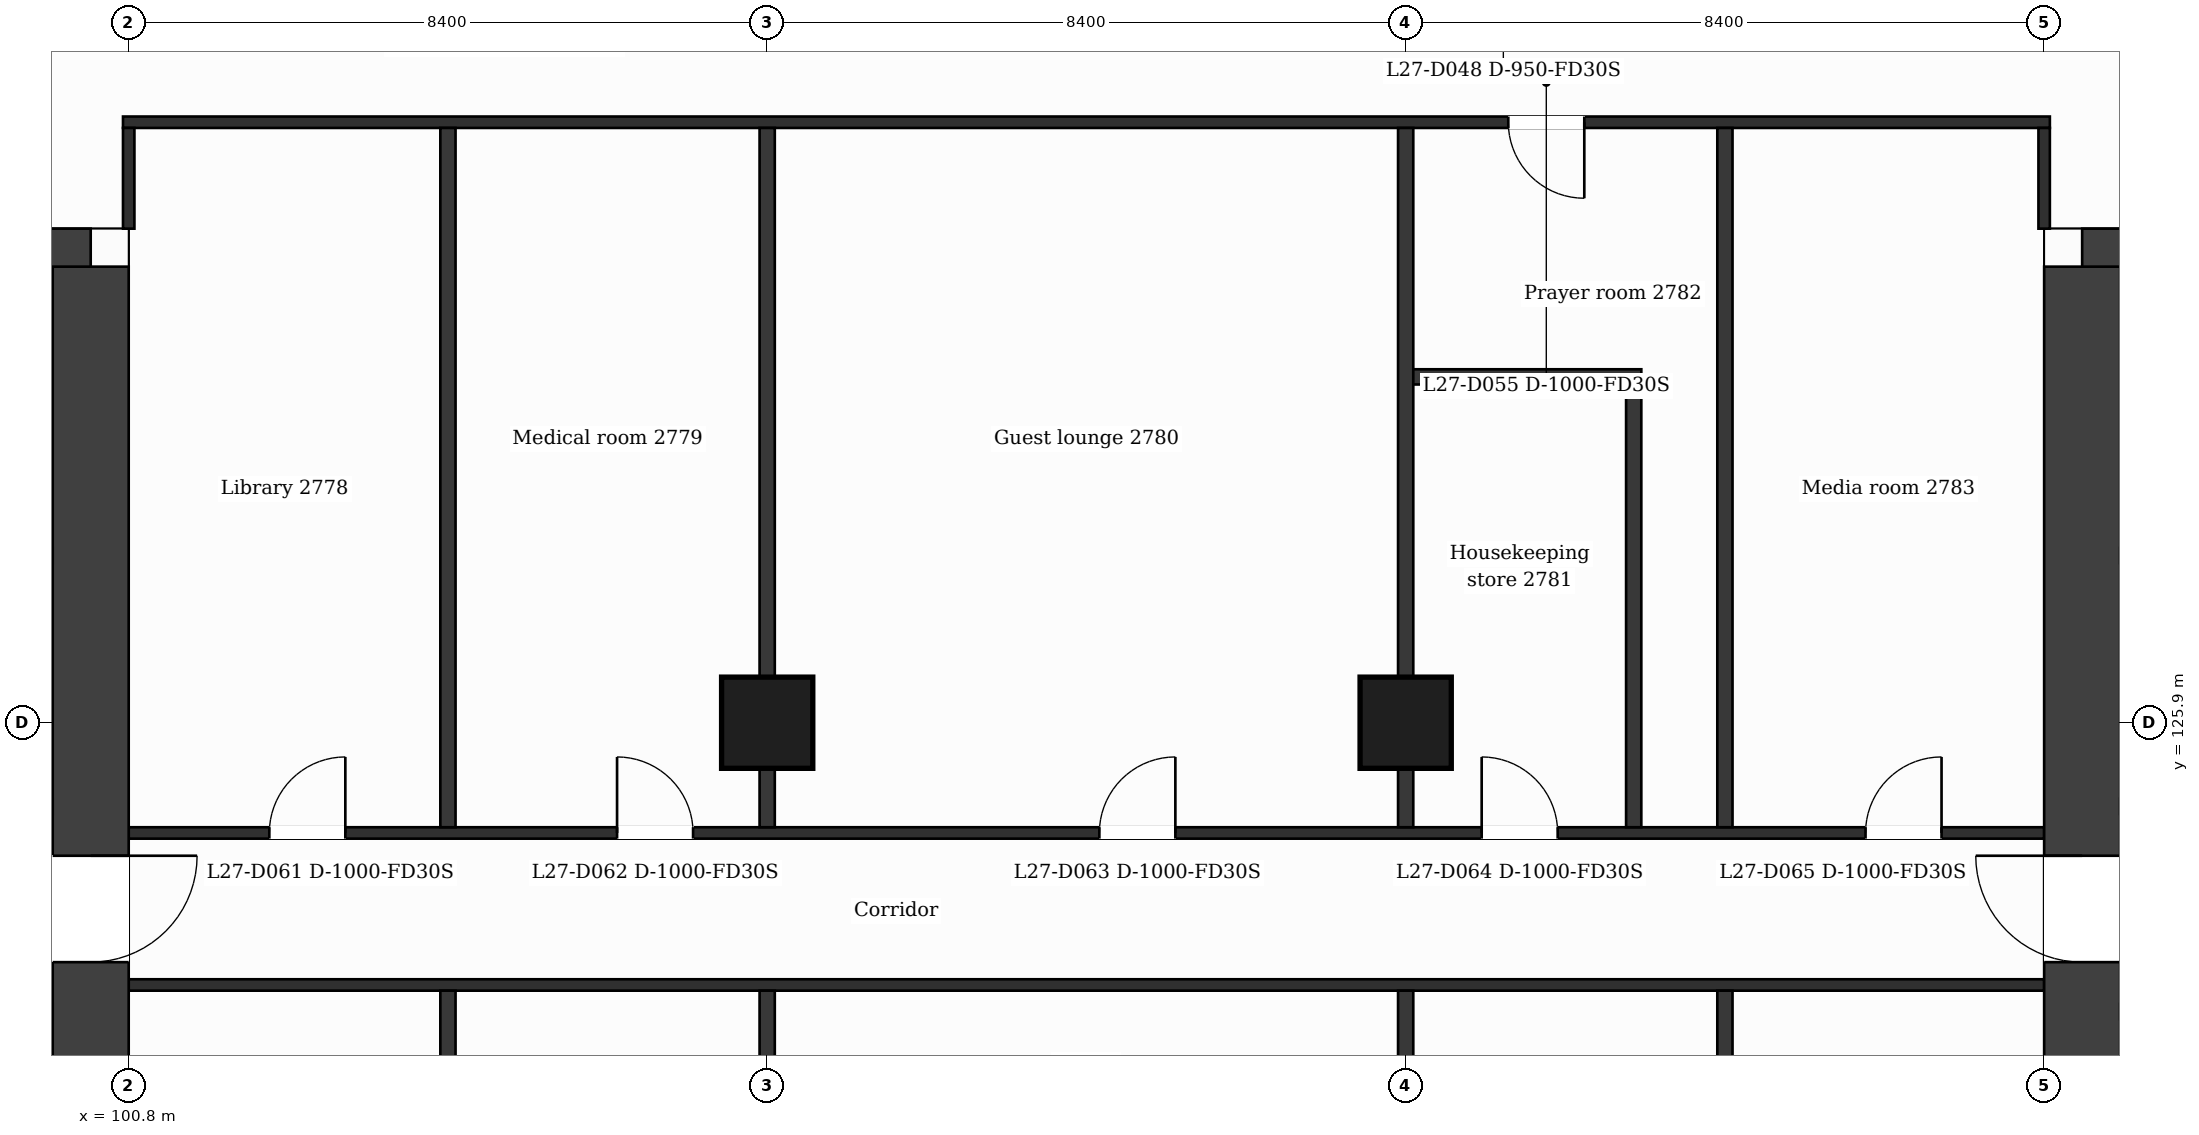
"""IFC4 building model, lengths in metres.
Left out: names, types, materials, properties, quantities, classifications, styles, units other than length and angle.
Written with IfcOpenShell. Run it as: python <this file> out.ifc"""

import sys

from ifc_helpers import new_model, si_unit, direction, frame, frame_2d, origin, origin_2d, place, context, subcontext, project, spatial, rectangle, extrude, element, fill, save


model = new_model("IFC4")
c1 = context("Model", 3, precision=1e-05, world=origin(), true_north=direction((0.0, 1.0)))
c2 = subcontext(c1, "Body", "Model", "MODEL_VIEW")
j1 = project(units=[si_unit("LENGTHUNIT", "METRE"), si_unit("PLANEANGLEUNIT", "RADIAN")], contexts=[c1])
p1 = place(None, origin())
s1 = spatial("IfcSite", under=j1, at=p1, CompositionType="ELEMENT")
p2 = place(p1, origin())
s2 = spatial("IfcBuilding", under=s1, at=p2, CompositionType="ELEMENT")
p3 = place(p2, frame((0.0, 0.0, 116.9)))
s3 = spatial("IfcBuildingStorey", under=s2, at=p3, CompositionType="ELEMENT", Elevation=116.9)
p4 = place(p3, frame((89.068, 131.9, 0.0), z_axis=(0.0, 0.0, 1.0), x_axis=(1.0, 0.0, 0.0)))
e1 = element("IfcWall", 1, at=p4, inside=s3, PredefinedType="SHEAR", context=c2, shape_type="SweptSolid", body=[
    extrude(rectangle(XDim=11.232, YDim=1.0, at=frame_2d((5.616, 0.0))), origin(), (0.0, 0.0, 1.0), 3.7),
])
p5 = place(p4, frame((6.646, 0.0, 0.0)))
e2 = element("IfcOpeningElement", 2, at=p5, cuts=e1, PredefinedType="OPENING", context=c2, shape_type="SweptSolid", body=[
    extrude(rectangle(XDim=1.2, YDim=2.1, at=frame_2d((0.6, 1.05))), frame((0.0, 0.51, 0.0), z_axis=(0.0, -1.0, 0.0), x_axis=(1.0, 0.0, 0.0)), (0.0, 0.0, 1.0), 1.02),
])
p6 = place(p3, frame((100.3, 131.9, 0.0), z_axis=(0.0, 0.0, 1.0), x_axis=(0.0, -1.0, 0.0)))
e3 = element("IfcWall", 3, at=p6, inside=s3, PredefinedType="SHEAR", context=c2, shape_type="SweptSolid", body=[
    extrude(rectangle(XDim=21.0, YDim=1.0, at=frame_2d((10.5, 0.0))), origin(), (0.0, 0.0, 1.0), 3.7),
])
p7 = place(p6, frame((7.75, 0.0, 0.0)))
e4 = element("IfcOpeningElement", 4, at=p7, cuts=e3, PredefinedType="OPENING", context=c2, shape_type="SweptSolid", body=[
    extrude(rectangle(XDim=1.4, YDim=2.1, at=frame_2d((0.7, 1.05))), frame((0.0, 0.51, 0.0), z_axis=(0.0, -1.0, 0.0), x_axis=(1.0, 0.0, 0.0)), (0.0, 0.0, 1.0), 1.02),
])
p8 = place(p3, frame((126.5, 131.9, 0.0), z_axis=(0.0, 0.0, 1.0), x_axis=(1.0, 0.0, 0.0)))
e5 = element("IfcWall", 5, at=p8, inside=s3, PredefinedType="SHEAR", context=c2, shape_type="SweptSolid", body=[
    extrude(rectangle(XDim=11.232, YDim=1.0, at=frame_2d((5.616, 0.0))), origin(), (0.0, 0.0, 1.0), 3.7),
])
p9 = place(p8, frame((3.386, 0.0, 0.0)))
e6 = element("IfcOpeningElement", 6, at=p9, cuts=e5, PredefinedType="OPENING", context=c2, shape_type="SweptSolid", body=[
    extrude(rectangle(XDim=1.2, YDim=2.1, at=frame_2d((0.6, 1.05))), frame((0.0, 0.51, 0.0), z_axis=(0.0, -1.0, 0.0), x_axis=(1.0, 0.0, 0.0)), (0.0, 0.0, 1.0), 1.02),
])
p10 = place(p3, frame((126.5, 110.9, 0.0), z_axis=(0.0, 0.0, 1.0), x_axis=(0.0, 1.0, 0.0)))
e7 = element("IfcWall", 7, at=p10, inside=s3, PredefinedType="SHEAR", context=c2, shape_type="SweptSolid", body=[
    extrude(rectangle(XDim=21.0, YDim=1.0, at=frame_2d((10.5, 0.0))), origin(), (0.0, 0.0, 1.0), 3.7),
])
p11 = place(p10, frame((11.85, 0.0, 0.0)))
e8 = element("IfcOpeningElement", 8, at=p11, cuts=e7, PredefinedType="OPENING", context=c2, shape_type="SweptSolid", body=[
    extrude(rectangle(XDim=1.4, YDim=2.1, at=frame_2d((0.7, 1.05))), frame((0.0, 0.51, 0.0), z_axis=(0.0, -1.0, 0.0), x_axis=(1.0, 0.0, 0.0)), (0.0, 0.0, 1.0), 1.02),
])
for number, where, z_axis, x_axis in (
    (9, (109.2, 125.9, 0.0), (0.0, 0.0, 1.0), (1.0, 0.0, 0.0)),
    (10, (117.6, 125.9, 0.0), (0.0, 0.0, 1.0), (1.0, 0.0, 0.0)),
):
    element("IfcColumn", number, at=place(p3, frame(where, z_axis=z_axis, x_axis=x_axis)), inside=s3, PredefinedType="COLUMN", context=c2, shape_type="SweptSolid", body=[
        extrude(rectangle(XDim=1.2, YDim=1.2, at=origin_2d()), origin(), (0.0, 0.0, 1.0), 3.7),
    ])
p12 = place(p3, frame((95.227, 122.1, 0.0), z_axis=(0.0, 0.0, 1.0), x_axis=(1.0, 0.0, 0.0)))
e11 = element("IfcWall", 11, at=p12, inside=s3, PredefinedType="PARTITIONING", context=c2, shape_type="SweptSolid", body=[
    extrude(rectangle(XDim=4.573, YDim=0.2, at=frame_2d((2.287, 0.0))), origin(), (0.0, 0.0, 1.0), 3.38),
])
p13 = place(p12, frame((2.134, 0.0, 0.0)))
e12 = element("IfcOpeningElement", 12, at=p13, cuts=e11, PredefinedType="OPENING", context=c2, shape_type="SweptSolid", body=[
    extrude(rectangle(XDim=0.9, YDim=2.1, at=frame_2d((0.45, 1.05))), frame((0.0, 0.11, 0.0), z_axis=(0.0, -1.0, 0.0), x_axis=(1.0, 0.0, 0.0)), (0.0, 0.0, 1.0), 0.22),
])
p14 = place(p3, frame((100.8, 122.45, 0.0), z_axis=(0.0, 0.0, 1.0), x_axis=(1.0, 0.0, 0.0)))
e13 = element("IfcWall", 13, at=p14, inside=s3, PredefinedType="PARTITIONING", context=c2, shape_type="SweptSolid", body=[
    extrude(rectangle(XDim=25.2, YDim=0.15, at=frame_2d((12.6, 0.0))), origin(), (0.0, 0.0, 1.0), 3.38),
])
p15 = place(p3, frame((100.8, 124.45, 0.0), z_axis=(0.0, 0.0, 1.0), x_axis=(1.0, 0.0, 0.0)))
e14 = element("IfcWall", 14, at=p15, inside=s3, PredefinedType="PARTITIONING", context=c2, shape_type="SweptSolid", body=[
    extrude(rectangle(XDim=25.2, YDim=0.15, at=frame_2d((12.6, 0.0))), origin(), (0.0, 0.0, 1.0), 3.38),
])
p16 = place(p15, frame((1.85, 0.0, 0.0)))
e15 = element("IfcOpeningElement", 15, at=p16, cuts=e14, PredefinedType="OPENING", context=c2, shape_type="SweptSolid", body=[
    extrude(rectangle(XDim=1.0, YDim=2.1, at=frame_2d((0.5, 1.05))), frame((0.0, 0.085, 0.0), z_axis=(0.0, -1.0, 0.0), x_axis=(1.0, 0.0, 0.0)), (0.0, 0.0, 1.0), 0.17),
])
p17 = place(p15, frame((6.425, 0.0, 0.0)))
e16 = element("IfcOpeningElement", 16, at=p17, cuts=e14, PredefinedType="OPENING", context=c2, shape_type="SweptSolid", body=[
    extrude(rectangle(XDim=1.0, YDim=2.1, at=frame_2d((0.5, 1.05))), frame((0.0, 0.085, 0.0), z_axis=(0.0, -1.0, 0.0), x_axis=(1.0, 0.0, 0.0)), (0.0, 0.0, 1.0), 0.17),
])
p18 = place(p15, frame((12.77, 0.0, 0.0)))
e17 = element("IfcOpeningElement", 17, at=p18, cuts=e14, PredefinedType="OPENING", context=c2, shape_type="SweptSolid", body=[
    extrude(rectangle(XDim=1.0, YDim=2.1, at=frame_2d((0.5, 1.05))), frame((0.0, 0.085, 0.0), z_axis=(0.0, -1.0, 0.0), x_axis=(1.0, 0.0, 0.0)), (0.0, 0.0, 1.0), 0.17),
])
p19 = place(p15, frame((17.8, 0.0, 0.0)))
e18 = element("IfcOpeningElement", 18, at=p19, cuts=e14, PredefinedType="OPENING", context=c2, shape_type="SweptSolid", body=[
    extrude(rectangle(XDim=1.0, YDim=2.1, at=frame_2d((0.5, 1.05))), frame((0.0, 0.085, 0.0), z_axis=(0.0, -1.0, 0.0), x_axis=(1.0, 0.0, 0.0)), (0.0, 0.0, 1.0), 0.17),
])
p20 = place(p15, frame((22.85, 0.0, 0.0)))
e19 = element("IfcOpeningElement", 19, at=p20, cuts=e14, PredefinedType="OPENING", context=c2, shape_type="SweptSolid", body=[
    extrude(rectangle(XDim=1.0, YDim=2.1, at=frame_2d((0.5, 1.05))), frame((0.0, 0.085, 0.0), z_axis=(0.0, -1.0, 0.0), x_axis=(1.0, 0.0, 0.0)), (0.0, 0.0, 1.0), 0.17),
])
p21 = place(p3, frame((127.0, 124.8, 0.0), z_axis=(0.0, 0.0, 1.0), x_axis=(1.0, 0.0, 0.0)))
e20 = element("IfcWall", 20, at=p21, inside=s3, PredefinedType="PARTITIONING", context=c2, shape_type="SweptSolid", body=[
    extrude(rectangle(XDim=4.649, YDim=0.2, at=frame_2d((2.324, 0.0))), origin(), (0.0, 0.0, 1.0), 3.38),
])
p22 = place(p21, frame((0.743, 0.0, 0.0)))
e21 = element("IfcOpeningElement", 21, at=p22, cuts=e20, PredefinedType="OPENING", context=c2, shape_type="SweptSolid", body=[
    extrude(rectangle(XDim=1.1, YDim=2.1, at=frame_2d((0.55, 1.05))), frame((0.0, 0.11, 0.0), z_axis=(0.0, -1.0, 0.0), x_axis=(1.0, 0.0, 0.0)), (0.0, 0.0, 1.0), 0.22),
])
p23 = place(p3, frame((127.0, 128.1, 0.0), z_axis=(0.0, 0.0, 1.0), x_axis=(1.0, 0.0, 0.0)))
e22 = element("IfcWall", 22, at=p23, inside=s3, PredefinedType="PARTITIONING", context=c2, shape_type="SweptSolid", body=[
    extrude(rectangle(XDim=4.649, YDim=0.2, at=frame_2d((2.324, 0.0))), origin(), (0.0, 0.0, 1.0), 3.38),
])
p24 = place(p23, frame((2.805, 0.0, 0.0)))
e23 = element("IfcOpeningElement", 23, at=p24, cuts=e22, PredefinedType="OPENING", context=c2, shape_type="SweptSolid", body=[
    extrude(rectangle(XDim=1.1, YDim=2.1, at=frame_2d((0.55, 1.05))), frame((0.0, 0.11, 0.0), z_axis=(0.0, -1.0, 0.0), x_axis=(1.0, 0.0, 0.0)), (0.0, 0.0, 1.0), 0.22),
])
p25 = place(p3, frame((117.6, 130.45, 0.0), z_axis=(0.0, 0.0, 1.0), x_axis=(1.0, 0.0, 0.0)))
e24 = element("IfcWall", 24, at=p25, inside=s3, PredefinedType="PARTITIONING", context=c2, shape_type="SweptSolid", body=[
    extrude(rectangle(XDim=3.1, YDim=0.2, at=frame_2d((1.55, 0.0))), origin(), (0.0, 0.0, 1.0), 3.38),
])
p26 = place(p3, frame((100.725, 133.8, 0.0), z_axis=(0.0, 0.0, 1.0), x_axis=(1.0, 0.0, 0.0)))
e25 = element("IfcWall", 25, at=p26, inside=s3, PredefinedType="PARTITIONING", context=c2, shape_type="SweptSolid", body=[
    extrude(rectangle(XDim=25.35, YDim=0.15, at=frame_2d((12.675, 0.0))), origin(), (0.0, 0.0, 1.0), 3.38),
])
p27 = place(p26, frame((18.225, 0.0, 0.0)))
e26 = element("IfcOpeningElement", 26, at=p27, cuts=e25, PredefinedType="OPENING", context=c2, shape_type="SweptSolid", body=[
    extrude(rectangle(XDim=1.0, YDim=2.1, at=frame_2d((0.5, 1.05))), frame((0.0, 0.085, 0.0), z_axis=(0.0, -1.0, 0.0), x_axis=(1.0, 0.0, 0.0)), (0.0, 0.0, 1.0), 0.17),
])
p28 = place(p3, frame((100.8, 132.4, 0.0), z_axis=(0.0, 0.0, 1.0), x_axis=(0.0, 1.0, 0.0)))
e27 = element("IfcWall", 27, at=p28, inside=s3, PredefinedType="PARTITIONING", context=c2, shape_type="SweptSolid", body=[
    extrude(rectangle(XDim=1.325, YDim=0.15, at=frame_2d((0.663, 0.0))), origin(), (0.0, 0.0, 1.0), 3.38),
])
p29 = place(p3, frame((105.0, 109.075, 0.0), z_axis=(0.0, 0.0, 1.0), x_axis=(0.0, 1.0, 0.0)))
e28 = element("IfcWall", 28, at=p29, inside=s3, PredefinedType="PARTITIONING", context=c2, shape_type="SweptSolid", body=[
    extrude(rectangle(XDim=13.3, YDim=0.2, at=frame_2d((6.65, 0.0))), origin(), (0.0, 0.0, 1.0), 3.38),
])
p30 = place(p3, frame((105.0, 124.525, 0.0), z_axis=(0.0, 0.0, 1.0), x_axis=(0.0, 1.0, 0.0)))
e29 = element("IfcWall", 29, at=p30, inside=s3, PredefinedType="PARTITIONING", context=c2, shape_type="SweptSolid", body=[
    extrude(rectangle(XDim=9.2, YDim=0.2, at=frame_2d((4.6, 0.0))), origin(), (0.0, 0.0, 1.0), 3.38),
])
p31 = place(p3, frame((109.2, 109.075, 0.0), z_axis=(0.0, 0.0, 1.0), x_axis=(0.0, 1.0, 0.0)))
e30 = element("IfcWall", 30, at=p31, inside=s3, PredefinedType="PARTITIONING", context=c2, shape_type="SweptSolid", body=[
    extrude(rectangle(XDim=13.3, YDim=0.2, at=frame_2d((6.65, 0.0))), origin(), (0.0, 0.0, 1.0), 3.38),
])
p32 = place(p3, frame((109.2, 124.525, 0.0), z_axis=(0.0, 0.0, 1.0), x_axis=(0.0, 1.0, 0.0)))
e31 = element("IfcWall", 31, at=p32, inside=s3, PredefinedType="PARTITIONING", context=c2, shape_type="SweptSolid", body=[
    extrude(rectangle(XDim=9.2, YDim=0.2, at=frame_2d((4.6, 0.0))), origin(), (0.0, 0.0, 1.0), 3.38),
])
p33 = place(p3, frame((117.6, 109.075, 0.0), z_axis=(0.0, 0.0, 1.0), x_axis=(0.0, 1.0, 0.0)))
e32 = element("IfcWall", 32, at=p33, inside=s3, PredefinedType="PARTITIONING", context=c2, shape_type="SweptSolid", body=[
    extrude(rectangle(XDim=13.3, YDim=0.2, at=frame_2d((6.65, 0.0))), origin(), (0.0, 0.0, 1.0), 3.38),
])
p34 = place(p3, frame((117.6, 124.525, 0.0), z_axis=(0.0, 0.0, 1.0), x_axis=(0.0, 1.0, 0.0)))
e33 = element("IfcWall", 33, at=p34, inside=s3, PredefinedType="PARTITIONING", context=c2, shape_type="SweptSolid", body=[
    extrude(rectangle(XDim=9.2, YDim=0.2, at=frame_2d((4.6, 0.0))), origin(), (0.0, 0.0, 1.0), 3.38),
])
p35 = place(p3, frame((120.6, 124.525, 0.0), z_axis=(0.0, 0.0, 1.0), x_axis=(0.0, 1.0, 0.0)))
e34 = element("IfcWall", 34, at=p35, inside=s3, PredefinedType="PARTITIONING", context=c2, shape_type="SweptSolid", body=[
    extrude(rectangle(XDim=5.825, YDim=0.2, at=frame_2d((2.913, 0.0))), origin(), (0.0, 0.0, 1.0), 3.38),
])
p36 = place(p3, frame((121.8, 109.075, 0.0), z_axis=(0.0, 0.0, 1.0), x_axis=(0.0, 1.0, 0.0)))
e35 = element("IfcWall", 35, at=p36, inside=s3, PredefinedType="PARTITIONING", context=c2, shape_type="SweptSolid", body=[
    extrude(rectangle(XDim=13.3, YDim=0.2, at=frame_2d((6.65, 0.0))), origin(), (0.0, 0.0, 1.0), 3.38),
])
p37 = place(p3, frame((121.8, 124.525, 0.0), z_axis=(0.0, 0.0, 1.0), x_axis=(0.0, 1.0, 0.0)))
e36 = element("IfcWall", 36, at=p37, inside=s3, PredefinedType="PARTITIONING", context=c2, shape_type="SweptSolid", body=[
    extrude(rectangle(XDim=9.2, YDim=0.2, at=frame_2d((4.6, 0.0))), origin(), (0.0, 0.0, 1.0), 3.38),
])
p38 = place(p3, frame((126.0, 132.4, 0.0), z_axis=(0.0, 0.0, 1.0), x_axis=(0.0, 1.0, 0.0)))
e37 = element("IfcWall", 37, at=p38, inside=s3, PredefinedType="PARTITIONING", context=c2, shape_type="SweptSolid", body=[
    extrude(rectangle(XDim=1.325, YDim=0.15, at=frame_2d((0.663, 0.0))), origin(), (0.0, 0.0, 1.0), 3.38),
])
p39 = place(p27, origin())
e38 = element("IfcDoor", 38, at=p39, inside=s3, OperationType="SINGLE_SWING_RIGHT", PredefinedType="DOOR", context=c2, shape_type="SweptSolid", body=[
    extrude(rectangle(XDim=1.0, YDim=2.1, at=frame_2d((0.5, 1.05))), frame((0.0, 0.025, 0.0), z_axis=(0.0, -1.0, 0.0), x_axis=(1.0, 0.0, 0.0)), (0.0, 0.0, 1.0), 0.05),
])
fill(e26, e38)
p40 = place(p16, origin())
e39 = element("IfcDoor", 39, at=p40, inside=s3, OperationType="SINGLE_SWING_RIGHT", PredefinedType="DOOR", context=c2, shape_type="SweptSolid", body=[
    extrude(rectangle(XDim=1.0, YDim=2.1, at=frame_2d((0.5, 1.05))), frame((0.0, 0.025, 0.0), z_axis=(0.0, -1.0, 0.0), x_axis=(1.0, 0.0, 0.0)), (0.0, 0.0, 1.0), 0.05),
])
fill(e15, e39)
p41 = place(p17, origin())
e40 = element("IfcDoor", 40, at=p41, inside=s3, OperationType="SINGLE_SWING_LEFT", PredefinedType="DOOR", context=c2, shape_type="SweptSolid", body=[
    extrude(rectangle(XDim=1.0, YDim=2.1, at=frame_2d((0.5, 1.05))), frame((0.0, 0.025, 0.0), z_axis=(0.0, -1.0, 0.0), x_axis=(1.0, 0.0, 0.0)), (0.0, 0.0, 1.0), 0.05),
])
fill(e16, e40)
p42 = place(p18, origin())
e41 = element("IfcDoor", 41, at=p42, inside=s3, OperationType="SINGLE_SWING_RIGHT", PredefinedType="DOOR", context=c2, shape_type="SweptSolid", body=[
    extrude(rectangle(XDim=1.0, YDim=2.1, at=frame_2d((0.5, 1.05))), frame((0.0, 0.025, 0.0), z_axis=(0.0, -1.0, 0.0), x_axis=(1.0, 0.0, 0.0)), (0.0, 0.0, 1.0), 0.05),
])
fill(e17, e41)
p43 = place(p19, origin())
e42 = element("IfcDoor", 42, at=p43, inside=s3, OperationType="SINGLE_SWING_LEFT", PredefinedType="DOOR", context=c2, shape_type="SweptSolid", body=[
    extrude(rectangle(XDim=1.0, YDim=2.1, at=frame_2d((0.5, 1.05))), frame((0.0, 0.025, 0.0), z_axis=(0.0, -1.0, 0.0), x_axis=(1.0, 0.0, 0.0)), (0.0, 0.0, 1.0), 0.05),
])
fill(e18, e42)
p44 = place(p20, origin())
e43 = element("IfcDoor", 43, at=p44, inside=s3, OperationType="SINGLE_SWING_RIGHT", PredefinedType="DOOR", context=c2, shape_type="SweptSolid", body=[
    extrude(rectangle(XDim=1.0, YDim=2.1, at=frame_2d((0.5, 1.05))), frame((0.0, 0.025, 0.0), z_axis=(0.0, -1.0, 0.0), x_axis=(1.0, 0.0, 0.0)), (0.0, 0.0, 1.0), 0.05),
])
fill(e19, e43)
p45 = place(p7, origin())
e44 = element("IfcDoor", 44, at=p45, inside=s3, OperationType="SINGLE_SWING_LEFT", PredefinedType="DOOR", context=c2, shape_type="SweptSolid", body=[
    extrude(rectangle(XDim=1.4, YDim=2.1, at=frame_2d((0.7, 1.05))), frame((0.0, 0.025, 0.0), z_axis=(0.0, -1.0, 0.0), x_axis=(1.0, 0.0, 0.0)), (0.0, 0.0, 1.0), 0.05),
])
fill(e4, e44)
p46 = place(p11, origin())
e45 = element("IfcDoor", 45, at=p46, inside=s3, OperationType="SINGLE_SWING_RIGHT", PredefinedType="DOOR", context=c2, shape_type="SweptSolid", body=[
    extrude(rectangle(XDim=1.4, YDim=2.1, at=frame_2d((0.7, 1.05))), frame((0.0, 0.025, 0.0), z_axis=(0.0, -1.0, 0.0), x_axis=(1.0, 0.0, 0.0)), (0.0, 0.0, 1.0), 0.05),
])
fill(e8, e45)
save(model, sys.argv[1])
